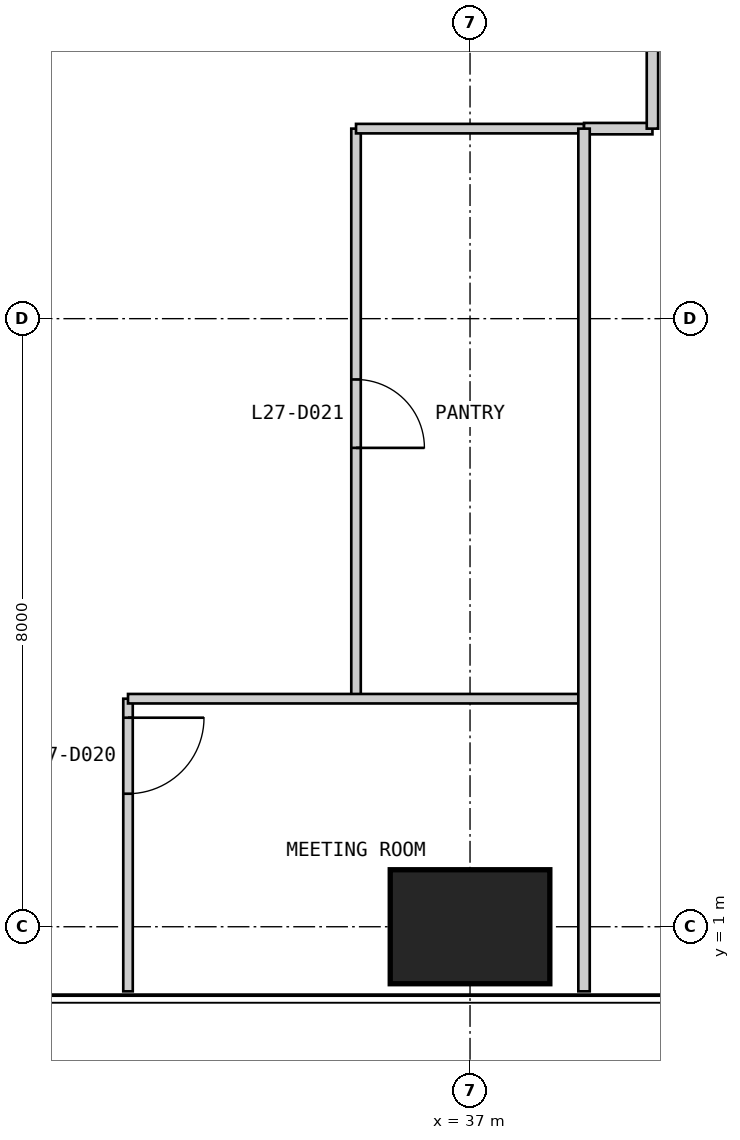
"""IFC4 building model, lengths in metres.
Left out: names, types, materials, properties, quantities, classifications, styles, units other than length and angle.
Written with IfcOpenShell. Run it as: python <this file> out.ifc"""

import sys

from ifc_helpers import new_model, si_unit, direction, frame, frame_2d, origin, origin_2d, place, context, subcontext, project, spatial, rectangle, extrude, element, fill, save


model = new_model("IFC4")
c1 = context("Model", 3, precision=1e-05, world=origin(), true_north=direction((0.0, 1.0)))
c2 = subcontext(c1, "Body", "Model", "MODEL_VIEW")
j1 = project(units=[si_unit("LENGTHUNIT", "METRE"), si_unit("PLANEANGLEUNIT", "RADIAN")], contexts=[c1])
p1 = place(None, origin())
s1 = spatial("IfcSite", under=j1, at=p1, CompositionType="ELEMENT")
p2 = place(p1, origin())
s2 = spatial("IfcBuilding", under=s1, at=p2, CompositionType="ELEMENT")
p3 = place(p2, frame((0.0, 0.0, 118.4)))
s3 = spatial("IfcBuildingStorey", under=s2, at=p3, CompositionType="ELEMENT", Elevation=118.4)
p4 = place(p3, frame((37.0, 1.0, 0.0), z_axis=(0.0, 0.0, 1.0), x_axis=(1.0, 0.0, 0.0)))
e1 = element("IfcColumn", 1, at=p4, inside=s3, PredefinedType="COLUMN", context=c2, shape_type="SweptSolid", body=[
    extrude(rectangle(XDim=2.1, YDim=1.5, at=origin_2d()), origin(), (0.0, 0.0, 1.0), 4.0),
])
p5 = place(p3, frame((32.5, 0.15, 0.0), z_axis=(0.0, 0.0, 1.0), x_axis=(0.0, 1.0, 0.0)))
e2 = element("IfcWall", 2, at=p5, inside=s3, PredefinedType="PARTITIONING", context=c2, shape_type="SweptSolid", body=[
    extrude(rectangle(XDim=3.85, YDim=0.125, at=frame_2d((1.925, 0.0))), origin(), (0.0, 0.0, 1.0), 3.85),
])
p6 = place(p5, frame((2.6, 0.0, 0.0)))
e3 = element("IfcOpeningElement", 3, at=p6, cuts=e2, PredefinedType="OPENING", context=c2, shape_type="SweptSolid", body=[
    extrude(rectangle(XDim=1.0, YDim=2.2, at=frame_2d((0.5, 1.1))), frame((0.0, 0.073, 0.0), z_axis=(0.0, -1.0, 0.0), x_axis=(1.0, 0.0, 0.0)), (0.0, 0.0, 1.0), 0.145),
])
p7 = place(p3, frame((35.5, 4.0, 0.0), z_axis=(0.0, 0.0, 1.0), x_axis=(0.0, 1.0, 0.0)))
e4 = element("IfcWall", 4, at=p7, inside=s3, PredefinedType="PARTITIONING", context=c2, shape_type="SweptSolid", body=[
    extrude(rectangle(XDim=7.5, YDim=0.125, at=frame_2d((3.75, 0.0))), origin(), (0.0, 0.0, 1.0), 3.85),
])
p8 = place(p7, frame((3.3, 0.0, 0.0)))
e5 = element("IfcOpeningElement", 5, at=p8, cuts=e4, PredefinedType="OPENING", context=c2, shape_type="SweptSolid", body=[
    extrude(rectangle(XDim=0.9, YDim=2.2, at=frame_2d((0.45, 1.1))), frame((0.0, 0.073, 0.0), z_axis=(0.0, -1.0, 0.0), x_axis=(1.0, 0.0, 0.0)), (0.0, 0.0, 1.0), 0.145),
])
p9 = place(p3, frame((32.5, 4.0, 0.0), z_axis=(0.0, 0.0, 1.0), x_axis=(1.0, 0.0, 0.0)))
e6 = element("IfcWall", 6, at=p9, inside=s3, PredefinedType="PARTITIONING", context=c2, shape_type="SweptSolid", body=[
    extrude(rectangle(XDim=6.0, YDim=0.125, at=frame_2d((3.0, 0.0))), origin(), (0.0, 0.0, 1.0), 3.85),
])
p10 = place(p3, frame((35.5, 11.5, 0.0), z_axis=(0.0, 0.0, 1.0), x_axis=(1.0, 0.0, 0.0)))
e7 = element("IfcWall", 7, at=p10, inside=s3, PredefinedType="PARTITIONING", context=c2, shape_type="SweptSolid", body=[
    extrude(rectangle(XDim=3.0, YDim=0.125, at=frame_2d((1.5, 0.0))), origin(), (0.0, 0.0, 1.0), 3.85),
])
p11 = place(p3, frame((38.5, 11.5, 0.0), z_axis=(0.0, 0.0, 1.0), x_axis=(1.0, 0.0, 0.0)))
e8 = element("IfcWall", 8, at=p11, inside=s3, PredefinedType="PARTITIONING", context=c2, shape_type="SweptSolid", body=[
    extrude(rectangle(XDim=0.9, YDim=0.15, at=frame_2d((0.45, 0.0))), origin(), (0.0, 0.0, 1.0), 3.85),
])
p12 = place(p3, frame((39.4, 11.5, 0.0), z_axis=(0.0, 0.0, 1.0), x_axis=(0.0, 1.0, 0.0)))
e9 = element("IfcWall", 9, at=p12, inside=s3, PredefinedType="PARTITIONING", context=c2, shape_type="SweptSolid", body=[
    extrude(rectangle(XDim=27.0, YDim=0.15, at=frame_2d((13.5, 0.0))), origin(), (0.0, 0.0, 1.0), 3.85),
])
p13 = place(p12, frame((3.25, 0.0, 0.0)))
e10 = element("IfcOpeningElement", 10, at=p13, cuts=e9, PredefinedType="OPENING", context=c2, shape_type="SweptSolid", body=[
    extrude(rectangle(XDim=1.0, YDim=2.2, at=frame_2d((0.5, 1.1))), frame((0.0, 0.085, 0.0), z_axis=(0.0, -1.0, 0.0), x_axis=(1.0, 0.0, 0.0)), (0.0, 0.0, 1.0), 0.17),
])
p14 = place(p12, frame((25.75, 0.0, 0.0)))
e11 = element("IfcOpeningElement", 11, at=p14, cuts=e9, PredefinedType="OPENING", context=c2, shape_type="SweptSolid", body=[
    extrude(rectangle(XDim=1.0, YDim=2.2, at=frame_2d((0.5, 1.1))), frame((0.0, 0.085, 0.0), z_axis=(0.0, -1.0, 0.0), x_axis=(1.0, 0.0, 0.0)), (0.0, 0.0, 1.0), 0.17),
])
p15 = place(p12, frame((1.75, 0.0, 0.0)))
e12 = element("IfcOpeningElement", 12, at=p15, cuts=e9, PredefinedType="OPENING", context=c2, shape_type="SweptSolid", body=[
    extrude(rectangle(XDim=1.0, YDim=2.2, at=frame_2d((0.5, 1.1))), frame((0.0, 0.085, 0.0), z_axis=(0.0, -1.0, 0.0), x_axis=(1.0, 0.0, 0.0)), (0.0, 0.0, 1.0), 0.17),
])
p16 = place(p3, frame((38.5, 0.15, 0.0), z_axis=(0.0, 0.0, 1.0), x_axis=(0.0, 1.0, 0.0)))
e13 = element("IfcWall", 13, at=p16, inside=s3, PredefinedType="PARTITIONING", context=c2, shape_type="SweptSolid", body=[
    extrude(rectangle(XDim=11.35, YDim=0.15, at=frame_2d((5.675, 0.0))), origin(), (0.0, 0.0, 1.0), 3.85),
])
p17 = place(p6, frame((1.0, 0.0, 0.0), z_axis=(0.0, 0.0, 1.0), x_axis=(-1.0, 0.0, 0.0)))
e14 = element("IfcDoor", 14, at=p17, inside=s3, OperationType="SINGLE_SWING_LEFT", PredefinedType="DOOR", context=c2, shape_type="SweptSolid", body=[
    extrude(rectangle(XDim=1.0, YDim=2.2, at=frame_2d((0.5, 1.1))), frame((0.0, 0.025, 0.0), z_axis=(0.0, -1.0, 0.0), x_axis=(1.0, 0.0, 0.0)), (0.0, 0.0, 1.0), 0.05),
])
fill(e3, e14)
p18 = place(p8, frame((0.9, 0.0, 0.0), z_axis=(0.0, 0.0, 1.0), x_axis=(-1.0, 0.0, 0.0)))
e15 = element("IfcDoor", 15, at=p18, inside=s3, OperationType="SINGLE_SWING_RIGHT", PredefinedType="DOOR", context=c2, shape_type="SweptSolid", body=[
    extrude(rectangle(XDim=0.9, YDim=2.2, at=frame_2d((0.45, 1.1))), frame((0.0, 0.025, 0.0), z_axis=(0.0, -1.0, 0.0), x_axis=(1.0, 0.0, 0.0)), (0.0, 0.0, 1.0), 0.05),
])
fill(e5, e15)
save(model, sys.argv[1])
